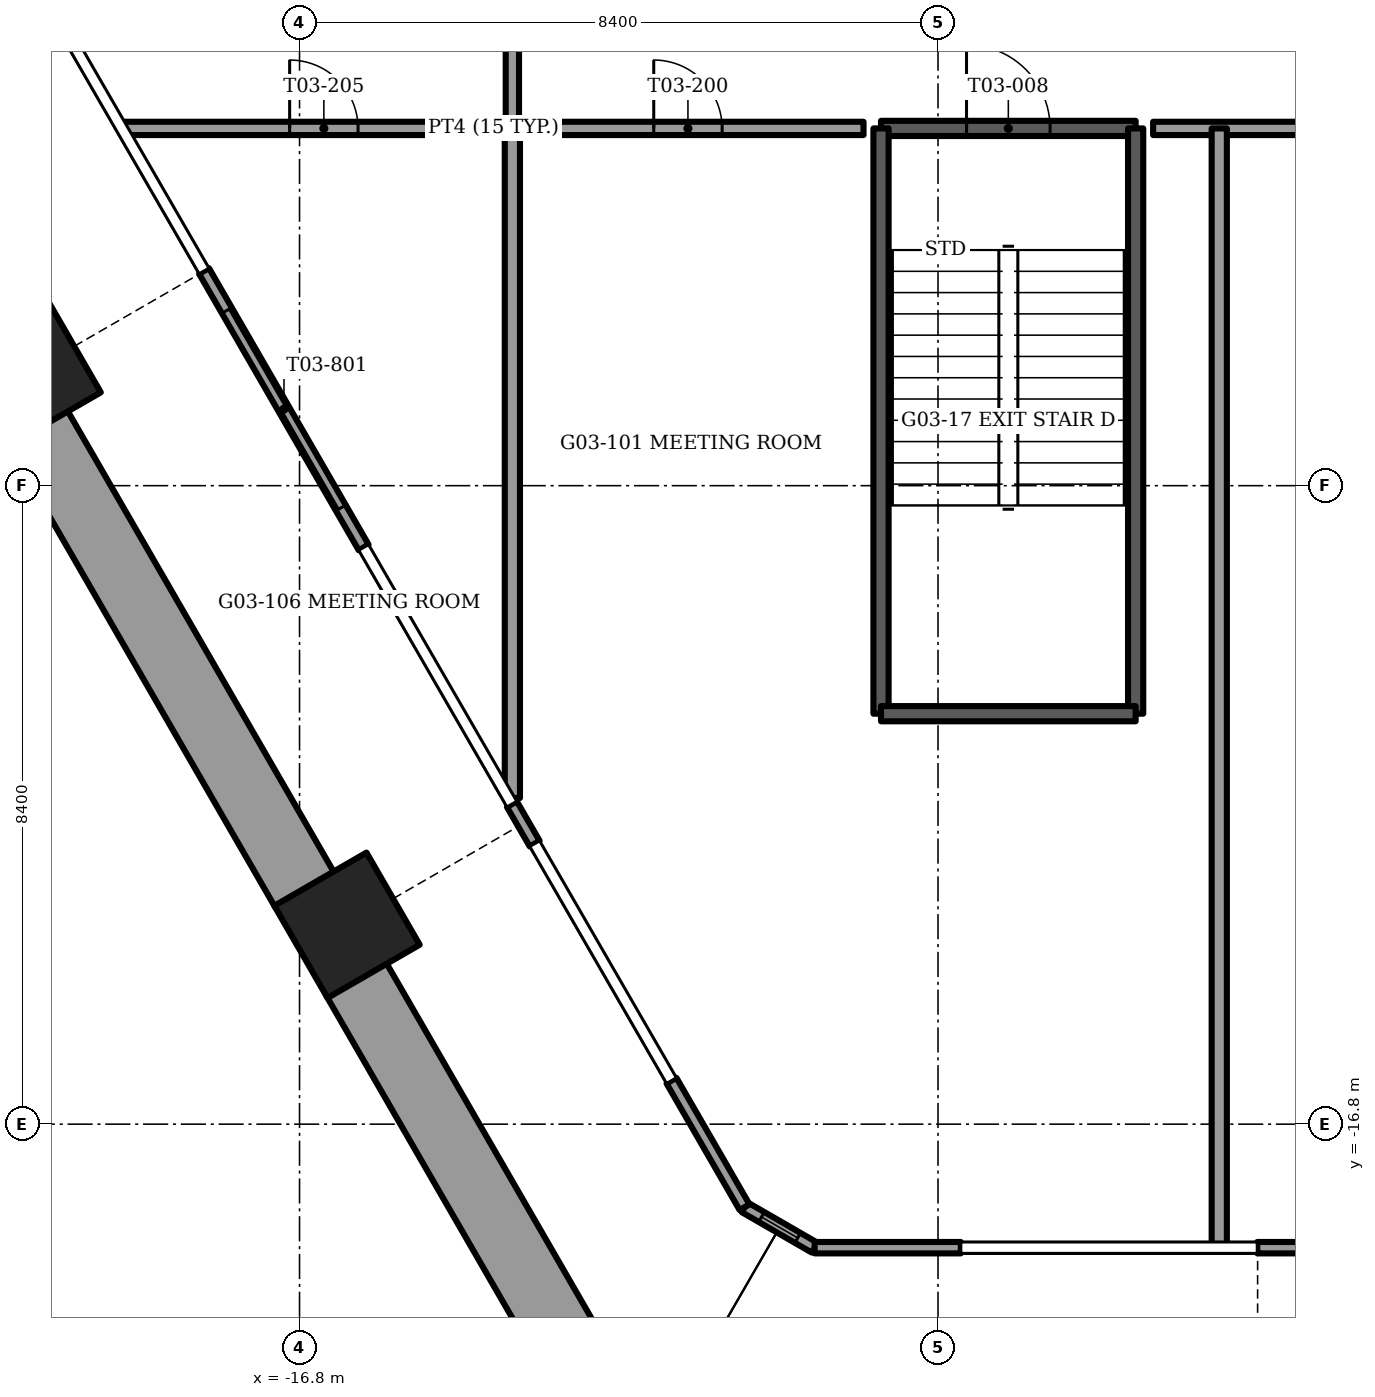
"""IFC4 building model, lengths in metres.
Left out: names, types, materials, properties, quantities, classifications, styles, units other than length and angle.
Written with IfcOpenShell. Run it as: python <this file> out.ifc"""

import sys

from ifc_helpers import new_model, si_unit, direction, frame, frame_2d, origin, origin_2d, place, context, subcontext, project, spatial, rectangle, extrude, element, fill, save


model = new_model("IFC4")
c1 = context("Model", 3, precision=1e-05, world=origin(), true_north=direction((0.0, 1.0)))
c2 = subcontext(c1, "Body", "Model", "MODEL_VIEW")
j1 = project(units=[si_unit("LENGTHUNIT", "METRE"), si_unit("PLANEANGLEUNIT", "RADIAN")], contexts=[c1])
p1 = place(None, origin())
s1 = spatial("IfcSite", under=j1, at=p1, CompositionType="ELEMENT")
p2 = place(p1, origin())
s2 = spatial("IfcBuilding", under=s1, at=p2, CompositionType="ELEMENT")
p3 = place(p2, frame((0.0, 0.0, 14.5)))
s3 = spatial("IfcBuildingStorey", under=s2, at=p3, CompositionType="ELEMENT", Elevation=14.5)
for number, where, z_axis, x_axis in (
    (1, (-20.371, -6.917, -1.2), (0.0, 0.0, 1.0), (-0.5, 0.866, 0.0)),
    (2, (-16.175, -14.183, -1.2), (0.0, 0.0, 1.0), (-0.5, 0.866, 0.0)),
):
    element("IfcColumn", number, at=place(p3, frame(where, z_axis=z_axis, x_axis=x_axis)), inside=s3, PredefinedType="COLUMN", context=c2, shape_type="SweptSolid", body=[
        extrude(rectangle(XDim=1.4, YDim=1.4, at=origin_2d()), origin(), (0.0, 0.0, 1.0), 4.5),
    ])
p4 = place(p3, frame((-20.252, -7.622, 0.0), z_axis=(0.0, 0.0, 1.0), x_axis=(0.499997206141, -0.866027016814, 0.0)))
e3 = element("IfcWall", 3, at=p4, inside=s3, PredefinedType="PARAPET", context=c2, shape_type="SweptSolid", body=[
    extrude(rectangle(XDim=7.051, YDim=0.9, at=frame_2d((3.525, 0.0))), origin(), (0.0, 0.0, 1.0), 1.1),
])
p5 = place(p3, frame((-16.057, -14.889, 0.0), z_axis=(0.0, 0.0, 1.0), x_axis=(0.500005133765, -0.866022439784, 0.0)))
e4 = element("IfcWall", 4, at=p5, inside=s3, PredefinedType="PARAPET", context=c2, shape_type="SweptSolid", body=[
    extrude(rectangle(XDim=6.704, YDim=0.9, at=frame_2d((3.352, 0.0))), origin(), (0.0, 0.0, 1.0), 1.1),
])
p6 = place(p3, frame((-18.056, -5.575, 0.0), z_axis=(0.0, 0.0, 1.0), x_axis=(0.49998411664, -0.866034573852, 0.0)))
e5 = element("IfcWall", 5, at=p6, inside=s3, PredefinedType="SOLIDWALL", context=c2, shape_type="SweptSolid", body=[
    extrude(rectangle(XDim=4.2, YDim=0.15, at=frame_2d((2.1, 0.0))), origin(), (0.0, 0.0, 1.0), 4.2),
])
p7 = place(p6, frame((0.6, 0.0, 0.0)))
e6 = element("IfcOpeningElement", 6, at=p7, cuts=e5, PredefinedType="OPENING", context=c2, shape_type="SweptSolid", body=[
    extrude(rectangle(XDim=3.0, YDim=2.4, at=frame_2d((1.5, 1.2))), frame((0.0, 0.075, 0.0), z_axis=(0.0, -1.0, 0.0), x_axis=(1.0, 0.0, 0.0)), (0.0, 0.0, 1.0), 0.15),
])
p8 = place(p3, frame((-11.906, -16.227, 0.0), z_axis=(0.0, 0.0, 1.0), x_axis=(0.499989888488, -0.86603124159, 0.0)))
e7 = element("IfcWall", 7, at=p8, inside=s3, PredefinedType="SOLIDWALL", context=c2, shape_type="SweptSolid", body=[
    extrude(rectangle(XDim=1.923, YDim=0.15, at=frame_2d((0.961, 0.0))), origin(), (0.0, 0.0, 1.0), 4.2),
])
p9 = place(p3, frame((-14.007, -12.59, 0.0), z_axis=(0.0, 0.0, 1.0), x_axis=(0.50012165622, -0.865955154139, 0.0)))
e8 = element("IfcWall", 8, at=p9, inside=s3, PredefinedType="SOLIDWALL", context=c2, shape_type="SweptSolid", body=[
    extrude(rectangle(XDim=0.6, YDim=0.15, at=frame_2d((0.3, 0.0))), origin(), (0.0, 0.0, 1.0), 4.2),
])
p10 = place(p3, frame((-4.2, -18.425, 0.0), z_axis=(0.0, 0.0, 1.0), x_axis=(1.0, 0.0, 0.0)))
e9 = element("IfcWall", 9, at=p10, inside=s3, PredefinedType="SOLIDWALL", context=c2, shape_type="SweptSolid", body=[
    extrude(rectangle(XDim=4.2, YDim=0.15, at=frame_2d((2.1, 0.0))), origin(), (0.0, 0.0, 1.0), 4.2),
])
p11 = place(p10, frame((0.6, 0.0, 0.0)))
e10 = element("IfcOpeningElement", 10, at=p11, cuts=e9, PredefinedType="OPENING", context=c2, shape_type="SweptSolid", body=[
    extrude(rectangle(XDim=3.0, YDim=2.4, at=frame_2d((1.5, 1.2))), frame((0.0, 0.075, 0.0), z_axis=(0.0, -1.0, 0.0), x_axis=(1.0, 0.0, 0.0)), (0.0, 0.0, 1.0), 0.15),
])
p12 = place(p3, frame((-10.023, -18.425, 0.0), z_axis=(0.0, 0.0, 1.0), x_axis=(1.0, 0.0, 0.0)))
e11 = element("IfcWall", 11, at=p12, inside=s3, PredefinedType="SOLIDWALL", context=c2, shape_type="SweptSolid", body=[
    extrude(rectangle(XDim=1.923, YDim=0.15, at=frame_2d((0.961, 0.0))), origin(), (0.0, 0.0, 1.0), 4.2),
])
p13 = place(p3, frame((-10.945, -17.893, 0.0), z_axis=(0.0, 0.0, 1.0), x_axis=(0.866048165231, -0.499960573946, 0.0)))
e12 = element("IfcWall", 12, at=p13, inside=s3, PredefinedType="SOLIDWALL", context=c2, shape_type="SweptSolid", body=[
    extrude(rectangle(XDim=1.065, YDim=0.15, at=frame_2d((0.532, 0.0))), origin(), (0.0, 0.0, 1.0), 4.2),
])
p14 = place(p13, frame((0.258, 0.0, 0.15)))
e13 = element("IfcOpeningElement", 13, at=p14, cuts=e12, PredefinedType="OPENING", context=c2, shape_type="SweptSolid", body=[
    extrude(rectangle(XDim=0.55, YDim=3.6, at=frame_2d((0.275, 1.8))), frame((0.0, 0.075, 0.0), z_axis=(0.0, -1.0, 0.0), x_axis=(1.0, 0.0, 0.0)), (0.0, 0.0, 1.0), 0.15),
])
p15 = place(p3, frame((-9.15, -3.7, -0.3), z_axis=(0.0, 0.0, 1.0), x_axis=(1.0, 0.0, 0.0)))
e14 = element("IfcWall", 14, at=p15, inside=s3, PredefinedType="SOLIDWALL", context=c2, shape_type="SweptSolid", body=[
    extrude(rectangle(XDim=3.35, YDim=0.2, at=frame_2d((1.675, 0.0))), origin(), (0.0, 0.0, 1.0), 4.5),
])
p16 = place(p15, frame((1.125, 0.0, 0.0)))
e15 = element("IfcOpeningElement", 15, at=p16, cuts=e14, PredefinedType="OPENING", context=c2, shape_type="SweptSolid", body=[
    extrude(rectangle(XDim=1.1, YDim=2.1, at=frame_2d((0.55, 1.05))), frame((0.0, 0.1, 0.0), z_axis=(0.0, -1.0, 0.0), x_axis=(1.0, 0.0, 0.0)), (0.0, 0.0, 1.0), 0.2),
])
for number, where, z_axis, x_axis in (
    (16, (-9.15, -3.7, -0.3), (0.0, 0.0, 1.0), (0.0, -1.0, 0.0)),
    (17, (-5.8, -3.7, -0.3), (0.0, 0.0, 1.0), (0.0, -1.0, 0.0)),
):
    element("IfcWall", number, at=place(p3, frame(where, z_axis=z_axis, x_axis=x_axis)), inside=s3, PredefinedType="SOLIDWALL", context=c2, shape_type="SweptSolid", body=[
        extrude(rectangle(XDim=7.7, YDim=0.2, at=frame_2d((3.85, 0.0))), origin(), (0.0, 0.0, 1.0), 4.5),
    ])
p17 = place(p3, frame((-9.15, -11.4, -0.3), z_axis=(0.0, 0.0, 1.0), x_axis=(1.0, 0.0, 0.0)))
e18 = element("IfcWall", 18, at=p17, inside=s3, PredefinedType="SOLIDWALL", context=c2, shape_type="SweptSolid", body=[
    extrude(rectangle(XDim=3.35, YDim=0.2, at=frame_2d((1.675, 0.0))), origin(), (0.0, 0.0, 1.0), 4.5),
])
p18 = place(p3, frame((-19.118, -3.7, 0.0), z_axis=(0.0, 0.0, 1.0), x_axis=(1.0, 0.0, 0.0)))
e19 = element("IfcWall", 19, at=p18, inside=s3, PredefinedType="PARTITIONING", context=c2, shape_type="SweptSolid", body=[
    extrude(rectangle(XDim=9.738, YDim=0.175, at=frame_2d((4.869, 0.0))), origin(), (0.0, 0.0, 1.0), 4.2),
])
p19 = place(p18, frame((6.978, 0.0, 0.0)))
e20 = element("IfcOpeningElement", 20, at=p19, cuts=e19, PredefinedType="OPENING", context=c2, shape_type="SweptSolid", body=[
    extrude(rectangle(XDim=0.9, YDim=2.1, at=frame_2d((0.45, 1.05))), frame((0.0, 0.087, 0.0), z_axis=(0.0, -1.0, 0.0), x_axis=(1.0, 0.0, 0.0)), (0.0, 0.0, 1.0), 0.175),
])
p20 = place(p18, frame((2.188, 0.0, 0.0)))
e21 = element("IfcOpeningElement", 21, at=p20, cuts=e19, PredefinedType="OPENING", context=c2, shape_type="SweptSolid", body=[
    extrude(rectangle(XDim=0.9, YDim=2.1, at=frame_2d((0.45, 1.05))), frame((0.0, 0.087, 0.0), z_axis=(0.0, -1.0, 0.0), x_axis=(1.0, 0.0, 0.0)), (0.0, 0.0, 1.0), 0.175),
])
p21 = place(p3, frame((-5.57, -3.7, 0.0), z_axis=(0.0, 0.0, 1.0), x_axis=(1.0, 0.0, 0.0)))
e22 = element("IfcWall", 22, at=p21, inside=s3, PredefinedType="PARTITIONING", context=c2, shape_type="SweptSolid", body=[
    extrude(rectangle(XDim=11.14, YDim=0.175, at=frame_2d((5.57, 0.0))), origin(), (0.0, 0.0, 1.0), 4.2),
])
p22 = place(p21, frame((2.97, 0.0, 0.0)))
e23 = element("IfcOpeningElement", 23, at=p22, cuts=e22, PredefinedType="OPENING", context=c2, shape_type="SweptSolid", body=[
    extrude(rectangle(XDim=0.9, YDim=2.1, at=frame_2d((0.45, 1.05))), frame((0.0, 0.087, 0.0), z_axis=(0.0, -1.0, 0.0), x_axis=(1.0, 0.0, 0.0)), (0.0, 0.0, 1.0), 0.175),
])
p23 = place(p21, frame((8.105, 0.0, 0.0)))
e24 = element("IfcOpeningElement", 24, at=p23, cuts=e22, PredefinedType="OPENING", context=c2, shape_type="SweptSolid", body=[
    extrude(rectangle(XDim=0.9, YDim=2.1, at=frame_2d((0.45, 1.05))), frame((0.0, 0.087, 0.0), z_axis=(0.0, -1.0, 0.0), x_axis=(1.0, 0.0, 0.0)), (0.0, 0.0, 1.0), 0.175),
])
p24 = place(p3, frame((-14.0, -3.7, 0.0), z_axis=(0.0, 0.0, 1.0), x_axis=(0.0, 1.0, 0.0)))
e25 = element("IfcWall", 25, at=p24, inside=s3, PredefinedType="PARTITIONING", context=c2, shape_type="SweptSolid", body=[
    extrude(rectangle(XDim=15.4, YDim=0.175, at=frame_2d((7.7, 0.0))), origin(), (0.0, 0.0, 1.0), 4.2),
])
p25 = place(p24, frame((4.5, 0.0, 0.0)))
e26 = element("IfcOpeningElement", 26, at=p25, cuts=e25, PredefinedType="OPENING", context=c2, shape_type="SweptSolid", body=[
    extrude(rectangle(XDim=1.6, YDim=2.1, at=frame_2d((0.8, 1.05))), frame((0.0, 0.087, 0.0), z_axis=(0.0, -1.0, 0.0), x_axis=(1.0, 0.0, 0.0)), (0.0, 0.0, 1.0), 0.175),
])
p26 = place(p24, frame((12.55, 0.0, 0.0)))
e27 = element("IfcOpeningElement", 27, at=p26, cuts=e25, PredefinedType="OPENING", context=c2, shape_type="SweptSolid", body=[
    extrude(rectangle(XDim=0.9, YDim=2.1, at=frame_2d((0.45, 1.05))), frame((0.0, 0.087, 0.0), z_axis=(0.0, -1.0, 0.0), x_axis=(1.0, 0.0, 0.0)), (0.0, 0.0, 1.0), 0.175),
])
p27 = place(p3, frame((-14.0, -12.509, 0.0), z_axis=(0.0, 0.0, 1.0), x_axis=(0.0, 1.0, 0.0)))
e28 = element("IfcWall", 28, at=p27, inside=s3, PredefinedType="PARTITIONING", context=c2, shape_type="SweptSolid", body=[
    extrude(rectangle(XDim=8.809, YDim=0.2, at=frame_2d((4.405, 0.0))), origin(), (0.0, 0.0, 1.0), 4.2),
])
p28 = place(p3, frame((-4.7, -18.406, 0.0), z_axis=(0.0, 0.0, 1.0), x_axis=(0.0, 1.0, 0.0)))
e29 = element("IfcWall", 29, at=p28, inside=s3, PredefinedType="PARTITIONING", context=c2, shape_type="SweptSolid", body=[
    extrude(rectangle(XDim=14.706, YDim=0.2, at=frame_2d((7.353, 0.0))), origin(), (0.0, 0.0, 1.0), 4.2),
])
p29 = place(p7, origin())
e30 = element("IfcDoor", 30, at=p29, inside=s3, OperationType="SLIDING_TO_RIGHT", PredefinedType="DOOR", context=c2, shape_type="SweptSolid", body=[
    extrude(rectangle(XDim=3.0, YDim=2.4, at=frame_2d((1.5, 1.2))), frame((0.0, 0.025, 0.0), z_axis=(0.0, -1.0, 0.0), x_axis=(1.0, 0.0, 0.0)), (0.0, 0.0, 1.0), 0.05),
])
fill(e6, e30)
p30 = place(p14, origin())
e31 = element("IfcWindow", 31, at=p30, inside=s3, PartitioningType="SINGLE_PANEL", PredefinedType="WINDOW", context=c2, shape_type="SweptSolid", body=[
    extrude(rectangle(XDim=0.55, YDim=3.6, at=frame_2d((0.275, 1.8))), frame((0.0, 0.03, 0.0), z_axis=(0.0, -1.0, 0.0), x_axis=(1.0, 0.0, 0.0)), (0.0, 0.0, 1.0), 0.06),
])
fill(e13, e31)
p31 = place(p16, origin())
e32 = element("IfcDoor", 32, at=p31, inside=s3, OperationType="SINGLE_SWING_LEFT", PredefinedType="DOOR", context=c2, shape_type="SweptSolid", body=[
    extrude(rectangle(XDim=1.1, YDim=2.1, at=frame_2d((0.55, 1.05))), frame((0.0, 0.025, 0.0), z_axis=(0.0, -1.0, 0.0), x_axis=(1.0, 0.0, 0.0)), (0.0, 0.0, 1.0), 0.05),
])
fill(e15, e32)
p32 = place(p19, origin())
e33 = element("IfcDoor", 33, at=p32, inside=s3, OperationType="SINGLE_SWING_RIGHT", PredefinedType="DOOR", context=c2, shape_type="SweptSolid", body=[
    extrude(rectangle(XDim=0.9, YDim=2.1, at=frame_2d((0.45, 1.05))), frame((0.0, 0.025, 0.0), z_axis=(0.0, -1.0, 0.0), x_axis=(1.0, 0.0, 0.0)), (0.0, 0.0, 1.0), 0.05),
])
fill(e20, e33)
p33 = place(p20, origin())
e34 = element("IfcDoor", 34, at=p33, inside=s3, OperationType="SINGLE_SWING_LEFT", PredefinedType="DOOR", context=c2, shape_type="SweptSolid", body=[
    extrude(rectangle(XDim=0.9, YDim=2.1, at=frame_2d((0.45, 1.05))), frame((0.0, 0.025, 0.0), z_axis=(0.0, -1.0, 0.0), x_axis=(1.0, 0.0, 0.0)), (0.0, 0.0, 1.0), 0.05),
])
fill(e21, e34)
save(model, sys.argv[1])
